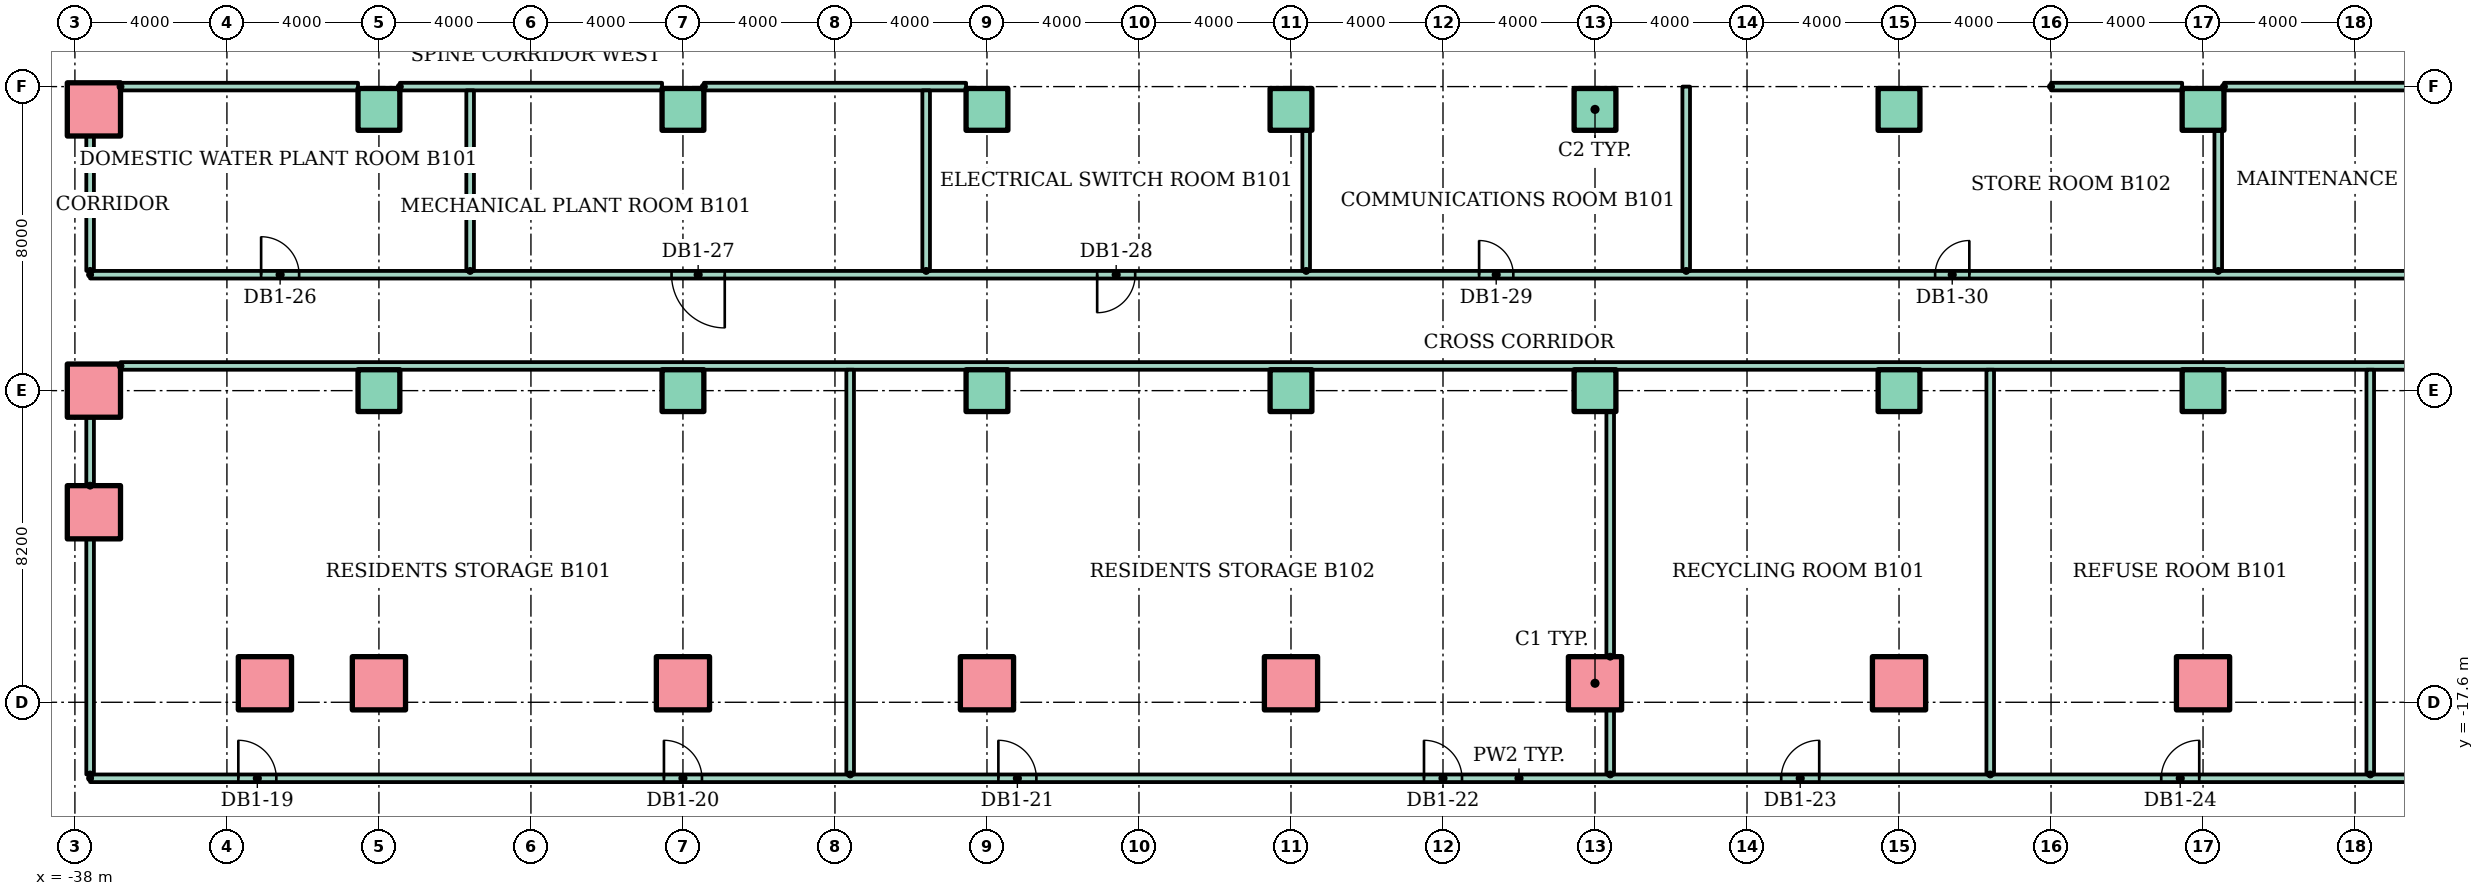
"""IFC4 building model, lengths in metres.
Left out: names, types, materials, properties, quantities, classifications, styles, units other than length and angle.
Written with IfcOpenShell. Run it as: python <this file> out.ifc"""

import sys

from ifc_helpers import new_model, si_unit, direction, frame, frame_2d, origin, origin_2d, place, context, subcontext, project, spatial, rectangle, hollow_rectangle, extrude, element, fill, save


model = new_model("IFC4")
c1 = context("Model", 3, precision=1e-05, world=origin(), true_north=direction((0.0, 1.0)))
c2 = subcontext(c1, "Body", "Model", "MODEL_VIEW")
j1 = project(units=[si_unit("LENGTHUNIT", "METRE"), si_unit("PLANEANGLEUNIT", "RADIAN")], contexts=[c1])
p1 = place(None, origin())
s1 = spatial("IfcSite", under=j1, at=p1, CompositionType="ELEMENT")
p2 = place(p1, origin())
s2 = spatial("IfcBuilding", under=s1, at=p2, CompositionType="ELEMENT")
p3 = place(p2, frame((0.0, 0.0, -5.0)))
s3 = spatial("IfcBuildingStorey", under=s2, at=p3, CompositionType="ELEMENT", Elevation=-5.0)
for number, where in (
    (1, (-33.0, -17.1, 0.0)),
    (2, (-30.0, -17.1, 0.0)),
    (3, (-22.0, -17.1, 0.0)),
    (4, (-14.0, -17.1, 0.0)),
    (5, (-6.0, -17.1, 0.0)),
    (6, (2.0, -17.1, 0.0)),
    (7, (10.0, -17.1, 0.0)),
    (8, (18.0, -17.1, 0.0)),
    (9, (-37.5, -12.6, 0.0)),
    (10, (-37.5, -9.4, 0.0)),
):
    element("IfcColumn", number, at=place(p3, frame(where)), inside=s3, PredefinedType="COLUMN", context=c2, shape_type="SweptSolid", body=[
        extrude(hollow_rectangle(XDim=1.4, YDim=1.4, WallThickness=0.08, at=origin_2d()), origin(), (0.0, 0.0, 1.0), 5.0),
    ])
for number, where in (
    (11, (-30.0, -9.4, 0.0)),
    (12, (-22.0, -9.4, 0.0)),
    (13, (-14.0, -9.4, 0.0)),
    (14, (-6.0, -9.4, 0.0)),
    (15, (2.0, -9.4, 0.0)),
    (16, (10.0, -9.4, 0.0)),
    (17, (18.0, -9.4, 0.0)),
):
    element("IfcColumn", number, at=place(p3, frame(where)), inside=s3, PredefinedType="COLUMN", context=c2, shape_type="SweptSolid", body=[
        extrude(rectangle(XDim=1.1, YDim=1.1, at=origin_2d()), origin(), (0.0, 0.0, 1.0), 5.0),
    ])
p4 = place(p3, frame((-37.5, -2.0, 0.0)))
e18 = element("IfcColumn", 18, at=p4, inside=s3, PredefinedType="COLUMN", context=c2, shape_type="SweptSolid", body=[
    extrude(hollow_rectangle(XDim=1.4, YDim=1.4, WallThickness=0.08, at=origin_2d()), origin(), (0.0, 0.0, 1.0), 5.0),
])
for number, where in (
    (19, (-30.0, -2.0, 0.0)),
    (20, (-22.0, -2.0, 0.0)),
    (21, (-14.0, -2.0, 0.0)),
    (22, (-6.0, -2.0, 0.0)),
    (23, (2.0, -2.0, 0.0)),
    (24, (10.0, -2.0, 0.0)),
    (25, (18.0, -2.0, 0.0)),
):
    element("IfcColumn", number, at=place(p3, frame(where)), inside=s3, PredefinedType="COLUMN", context=c2, shape_type="SweptSolid", body=[
        extrude(rectangle(XDim=1.1, YDim=1.1, at=origin_2d()), origin(), (0.0, 0.0, 1.0), 5.0),
    ])
p5 = place(p3, frame((-37.6, -19.6, 0.0)))
e26 = element("IfcWall", 26, at=p5, inside=s3, PredefinedType="PARTITIONING", context=c2, shape_type="SweptSolid", body=[
    extrude(rectangle(XDim=75.2, YDim=0.2, at=frame_2d((37.6, 0.0))), origin(), (0.0, 0.0, 1.0), 4.58),
])
p6 = place(p5, frame((3.9, 0.0, 0.0)))
e27 = element("IfcOpeningElement", 27, at=p6, cuts=e26, PredefinedType="OPENING", context=c2, shape_type="SweptSolid", body=[
    extrude(rectangle(XDim=1.0, YDim=2.1, at=frame_2d((0.5, 1.05))), frame((0.0, 0.11, 0.0), z_axis=(0.0, -1.0, 0.0), x_axis=(1.0, 0.0, 0.0)), (0.0, 0.0, 1.0), 0.22),
])
p7 = place(p5, frame((15.1, 0.0, 0.0)))
e28 = element("IfcOpeningElement", 28, at=p7, cuts=e26, PredefinedType="OPENING", context=c2, shape_type="SweptSolid", body=[
    extrude(rectangle(XDim=1.0, YDim=2.1, at=frame_2d((0.5, 1.05))), frame((0.0, 0.11, 0.0), z_axis=(0.0, -1.0, 0.0), x_axis=(1.0, 0.0, 0.0)), (0.0, 0.0, 1.0), 0.22),
])
p8 = place(p5, frame((23.9, 0.0, 0.0)))
e29 = element("IfcOpeningElement", 29, at=p8, cuts=e26, PredefinedType="OPENING", context=c2, shape_type="SweptSolid", body=[
    extrude(rectangle(XDim=1.0, YDim=2.1, at=frame_2d((0.5, 1.05))), frame((0.0, 0.11, 0.0), z_axis=(0.0, -1.0, 0.0), x_axis=(1.0, 0.0, 0.0)), (0.0, 0.0, 1.0), 0.22),
])
p9 = place(p5, frame((35.1, 0.0, 0.0)))
e30 = element("IfcOpeningElement", 30, at=p9, cuts=e26, PredefinedType="OPENING", context=c2, shape_type="SweptSolid", body=[
    extrude(rectangle(XDim=1.0, YDim=2.1, at=frame_2d((0.5, 1.05))), frame((0.0, 0.11, 0.0), z_axis=(0.0, -1.0, 0.0), x_axis=(1.0, 0.0, 0.0)), (0.0, 0.0, 1.0), 0.22),
])
p10 = place(p5, frame((44.5, 0.0, 0.0)))
e31 = element("IfcOpeningElement", 31, at=p10, cuts=e26, PredefinedType="OPENING", context=c2, shape_type="SweptSolid", body=[
    extrude(rectangle(XDim=1.0, YDim=2.1, at=frame_2d((0.5, 1.05))), frame((0.0, 0.11, 0.0), z_axis=(0.0, -1.0, 0.0), x_axis=(1.0, 0.0, 0.0)), (0.0, 0.0, 1.0), 0.22),
])
p11 = place(p5, frame((54.5, 0.0, 0.0)))
e32 = element("IfcOpeningElement", 32, at=p11, cuts=e26, PredefinedType="OPENING", context=c2, shape_type="SweptSolid", body=[
    extrude(rectangle(XDim=1.0, YDim=2.1, at=frame_2d((0.5, 1.05))), frame((0.0, 0.11, 0.0), z_axis=(0.0, -1.0, 0.0), x_axis=(1.0, 0.0, 0.0)), (0.0, 0.0, 1.0), 0.22),
])
p12 = place(p5, frame((67.15, 0.0, 0.0)))
e33 = element("IfcOpeningElement", 33, at=p12, cuts=e26, PredefinedType="OPENING", context=c2, shape_type="SweptSolid", body=[
    extrude(rectangle(XDim=0.9, YDim=2.1, at=frame_2d((0.45, 1.05))), frame((0.0, 0.11, 0.0), z_axis=(0.0, -1.0, 0.0), x_axis=(1.0, 0.0, 0.0)), (0.0, 0.0, 1.0), 0.22),
])
p13 = place(p3, frame((-36.8, -8.75, 0.0)))
e34 = element("IfcWall", 34, at=p13, inside=s3, PredefinedType="PARTITIONING", context=c2, shape_type="SweptSolid", body=[
    extrude(rectangle(XDim=73.6, YDim=0.2, at=frame_2d((36.8, 0.0))), origin(), (0.0, 0.0, 1.0), 4.58),
])
p14 = place(p3, frame((-37.6, -6.35, 0.0)))
e35 = element("IfcWall", 35, at=p14, inside=s3, PredefinedType="PARTITIONING", context=c2, shape_type="SweptSolid", body=[
    extrude(rectangle(XDim=75.2, YDim=0.2, at=frame_2d((37.6, 0.0))), origin(), (0.0, 0.0, 1.0), 4.58),
])
p15 = place(p14, frame((4.5, 0.0, 0.0)))
e36 = element("IfcOpeningElement", 36, at=p15, cuts=e35, PredefinedType="OPENING", context=c2, shape_type="SweptSolid", body=[
    extrude(rectangle(XDim=1.0, YDim=2.1, at=frame_2d((0.5, 1.05))), frame((0.0, 0.11, 0.0), z_axis=(0.0, -1.0, 0.0), x_axis=(1.0, 0.0, 0.0)), (0.0, 0.0, 1.0), 0.22),
])
p16 = place(p14, frame((15.3, 0.0, 0.0)))
e37 = element("IfcOpeningElement", 37, at=p16, cuts=e35, PredefinedType="OPENING", context=c2, shape_type="SweptSolid", body=[
    extrude(rectangle(XDim=1.4, YDim=2.1, at=frame_2d((0.7, 1.05))), frame((0.0, 0.11, 0.0), z_axis=(0.0, -1.0, 0.0), x_axis=(1.0, 0.0, 0.0)), (0.0, 0.0, 1.0), 0.22),
])
p17 = place(p14, frame((26.5, 0.0, 0.0)))
e38 = element("IfcOpeningElement", 38, at=p17, cuts=e35, PredefinedType="OPENING", context=c2, shape_type="SweptSolid", body=[
    extrude(rectangle(XDim=1.0, YDim=2.1, at=frame_2d((0.5, 1.05))), frame((0.0, 0.11, 0.0), z_axis=(0.0, -1.0, 0.0), x_axis=(1.0, 0.0, 0.0)), (0.0, 0.0, 1.0), 0.22),
])
p18 = place(p14, frame((36.55, 0.0, 0.0)))
e39 = element("IfcOpeningElement", 39, at=p18, cuts=e35, PredefinedType="OPENING", context=c2, shape_type="SweptSolid", body=[
    extrude(rectangle(XDim=0.9, YDim=2.1, at=frame_2d((0.45, 1.05))), frame((0.0, 0.11, 0.0), z_axis=(0.0, -1.0, 0.0), x_axis=(1.0, 0.0, 0.0)), (0.0, 0.0, 1.0), 0.22),
])
p19 = place(p14, frame((48.55, 0.0, 0.0)))
e40 = element("IfcOpeningElement", 40, at=p19, cuts=e35, PredefinedType="OPENING", context=c2, shape_type="SweptSolid", body=[
    extrude(rectangle(XDim=0.9, YDim=2.1, at=frame_2d((0.45, 1.05))), frame((0.0, 0.11, 0.0), z_axis=(0.0, -1.0, 0.0), x_axis=(1.0, 0.0, 0.0)), (0.0, 0.0, 1.0), 0.22),
])
p20 = place(p14, frame((65.1, 0.0, 0.0)))
e41 = element("IfcOpeningElement", 41, at=p20, cuts=e35, PredefinedType="OPENING", context=c2, shape_type="SweptSolid", body=[
    extrude(rectangle(XDim=1.0, YDim=2.1, at=frame_2d((0.5, 1.05))), frame((0.0, 0.11, 0.0), z_axis=(0.0, -1.0, 0.0), x_axis=(1.0, 0.0, 0.0)), (0.0, 0.0, 1.0), 0.22),
])
p21 = place(p3, frame((-36.8, -1.4, 0.0)))
e42 = element("IfcWall", 42, at=p21, inside=s3, PredefinedType="PARTITIONING", context=c2, shape_type="SweptSolid", body=[
    extrude(rectangle(XDim=6.25, YDim=0.2, at=frame_2d((3.125, 0.0))), origin(), (0.0, 0.0, 1.0), 4.58),
])
for number, where in (
    (43, (-29.45, -1.4, 0.0)),
    (44, (-21.45, -1.4, 0.0)),
):
    element("IfcWall", number, at=place(p3, frame(where)), inside=s3, PredefinedType="PARTITIONING", context=c2, shape_type="SweptSolid", body=[
        extrude(rectangle(XDim=6.9, YDim=0.2, at=frame_2d((3.45, 0.0))), origin(), (0.0, 0.0, 1.0), 4.58),
    ])
p22 = place(p3, frame((14.0, -1.4, 0.0)))
e45 = element("IfcWall", 45, at=p22, inside=s3, PredefinedType="PARTITIONING", context=c2, shape_type="SweptSolid", body=[
    extrude(rectangle(XDim=3.45, YDim=0.2, at=frame_2d((1.725, 0.0))), origin(), (0.0, 0.0, 1.0), 4.58),
])
p23 = place(p3, frame((18.55, -1.4, 0.0)))
e46 = element("IfcWall", 46, at=p23, inside=s3, PredefinedType="PARTITIONING", context=c2, shape_type="SweptSolid", body=[
    extrude(rectangle(XDim=6.9, YDim=0.2, at=frame_2d((3.45, 0.0))), origin(), (0.0, 0.0, 1.0), 4.58),
])
p24 = place(p3, frame((-37.6, -19.5, 0.0), z_axis=(0.0, 0.0, 1.0), x_axis=(0.0, 1.0, 0.0)))
e47 = element("IfcWall", 47, at=p24, inside=s3, PredefinedType="PARTITIONING", context=c2, shape_type="SweptSolid", body=[
    extrude(rectangle(XDim=6.2, YDim=0.2, at=frame_2d((3.1, 0.0))), origin(), (0.0, 0.0, 1.0), 4.58),
])
p25 = place(p3, frame((-37.6, -11.9, 0.0), z_axis=(0.0, 0.0, 1.0), x_axis=(0.0, 1.0, 0.0)))
e48 = element("IfcWall", 48, at=p25, inside=s3, PredefinedType="PARTITIONING", context=c2, shape_type="SweptSolid", body=[
    extrude(rectangle(XDim=1.8, YDim=0.2, at=frame_2d((0.9, 0.0))), origin(), (0.0, 0.0, 1.0), 4.58),
])
p26 = place(p3, frame((-37.6, -6.25, 0.0), z_axis=(0.0, 0.0, 1.0), x_axis=(0.0, 1.0, 0.0)))
e49 = element("IfcWall", 49, at=p26, inside=s3, PredefinedType="PARTITIONING", context=c2, shape_type="SweptSolid", body=[
    extrude(rectangle(XDim=3.55, YDim=0.2, at=frame_2d((1.775, 0.0))), origin(), (0.0, 0.0, 1.0), 4.58),
])
p27 = place(p3, frame((-27.6, -6.25, 0.0), z_axis=(0.0, 0.0, 1.0), x_axis=(0.0, 1.0, 0.0)))
e50 = element("IfcWall", 50, at=p27, inside=s3, PredefinedType="PARTITIONING", context=c2, shape_type="SweptSolid", body=[
    extrude(rectangle(XDim=4.75, YDim=0.2, at=frame_2d((2.375, 0.0))), origin(), (0.0, 0.0, 1.0), 4.58),
])
p28 = place(p3, frame((-17.6, -19.5, 0.0), z_axis=(0.0, 0.0, 1.0), x_axis=(0.0, 1.0, 0.0)))
e51 = element("IfcWall", 51, at=p28, inside=s3, PredefinedType="PARTITIONING", context=c2, shape_type="SweptSolid", body=[
    extrude(rectangle(XDim=10.65, YDim=0.2, at=frame_2d((5.325, 0.0))), origin(), (0.0, 0.0, 1.0), 4.58),
])
p29 = place(p3, frame((-15.6, -6.25, 0.0), z_axis=(0.0, 0.0, 1.0), x_axis=(0.0, 1.0, 0.0)))
e52 = element("IfcWall", 52, at=p29, inside=s3, PredefinedType="PARTITIONING", context=c2, shape_type="SweptSolid", body=[
    extrude(rectangle(XDim=4.75, YDim=0.2, at=frame_2d((2.375, 0.0))), origin(), (0.0, 0.0, 1.0), 4.58),
])
p30 = place(p3, frame((-5.6, -6.25, 0.0), z_axis=(0.0, 0.0, 1.0), x_axis=(0.0, 1.0, 0.0)))
e53 = element("IfcWall", 53, at=p30, inside=s3, PredefinedType="PARTITIONING", context=c2, shape_type="SweptSolid", body=[
    extrude(rectangle(XDim=3.7, YDim=0.2, at=frame_2d((1.85, 0.0))), origin(), (0.0, 0.0, 1.0), 4.58),
])
p31 = place(p3, frame((2.4, -19.5, 0.0), z_axis=(0.0, 0.0, 1.0), x_axis=(0.0, 1.0, 0.0)))
e54 = element("IfcWall", 54, at=p31, inside=s3, PredefinedType="PARTITIONING", context=c2, shape_type="SweptSolid", body=[
    extrude(rectangle(XDim=1.7, YDim=0.2, at=frame_2d((0.85, 0.0))), origin(), (0.0, 0.0, 1.0), 4.58),
])
p32 = place(p3, frame((2.4, -16.4, 0.0), z_axis=(0.0, 0.0, 1.0), x_axis=(0.0, 1.0, 0.0)))
e55 = element("IfcWall", 55, at=p32, inside=s3, PredefinedType="PARTITIONING", context=c2, shape_type="SweptSolid", body=[
    extrude(rectangle(XDim=6.45, YDim=0.2, at=frame_2d((3.225, 0.0))), origin(), (0.0, 0.0, 1.0), 4.58),
])
p33 = place(p3, frame((4.4, -6.25, 0.0), z_axis=(0.0, 0.0, 1.0), x_axis=(0.0, 1.0, 0.0)))
e56 = element("IfcWall", 56, at=p33, inside=s3, PredefinedType="PARTITIONING", context=c2, shape_type="SweptSolid", body=[
    extrude(rectangle(XDim=4.85, YDim=0.2, at=frame_2d((2.425, 0.0))), origin(), (0.0, 0.0, 1.0), 4.58),
])
p34 = place(p3, frame((12.4, -19.5, 0.0), z_axis=(0.0, 0.0, 1.0), x_axis=(0.0, 1.0, 0.0)))
e57 = element("IfcWall", 57, at=p34, inside=s3, PredefinedType="PARTITIONING", context=c2, shape_type="SweptSolid", body=[
    extrude(rectangle(XDim=10.65, YDim=0.2, at=frame_2d((5.325, 0.0))), origin(), (0.0, 0.0, 1.0), 4.58),
])
p35 = place(p3, frame((18.4, -6.25, 0.0), z_axis=(0.0, 0.0, 1.0), x_axis=(0.0, 1.0, 0.0)))
e58 = element("IfcWall", 58, at=p35, inside=s3, PredefinedType="PARTITIONING", context=c2, shape_type="SweptSolid", body=[
    extrude(rectangle(XDim=3.7, YDim=0.2, at=frame_2d((1.85, 0.0))), origin(), (0.0, 0.0, 1.0), 4.58),
])
p36 = place(p3, frame((22.4, -19.5, 0.0), z_axis=(0.0, 0.0, 1.0), x_axis=(0.0, 1.0, 0.0)))
e59 = element("IfcWall", 59, at=p36, inside=s3, PredefinedType="PARTITIONING", context=c2, shape_type="SweptSolid", body=[
    extrude(rectangle(XDim=10.65, YDim=0.2, at=frame_2d((5.325, 0.0))), origin(), (0.0, 0.0, 1.0), 4.58),
])
p37 = place(p6, origin())
e60 = element("IfcDoor", 60, at=p37, inside=s3, OperationType="SINGLE_SWING_LEFT", PredefinedType="DOOR", context=c2, shape_type="SweptSolid", body=[
    extrude(rectangle(XDim=1.0, YDim=2.1, at=frame_2d((0.5, 1.05))), frame((0.0, 0.025, 0.0), z_axis=(0.0, -1.0, 0.0), x_axis=(1.0, 0.0, 0.0)), (0.0, 0.0, 1.0), 0.05),
])
fill(e27, e60)
p38 = place(p7, origin())
e61 = element("IfcDoor", 61, at=p38, inside=s3, OperationType="SINGLE_SWING_LEFT", PredefinedType="DOOR", context=c2, shape_type="SweptSolid", body=[
    extrude(rectangle(XDim=1.0, YDim=2.1, at=frame_2d((0.5, 1.05))), frame((0.0, 0.025, 0.0), z_axis=(0.0, -1.0, 0.0), x_axis=(1.0, 0.0, 0.0)), (0.0, 0.0, 1.0), 0.05),
])
fill(e28, e61)
p39 = place(p8, origin())
e62 = element("IfcDoor", 62, at=p39, inside=s3, OperationType="SINGLE_SWING_LEFT", PredefinedType="DOOR", context=c2, shape_type="SweptSolid", body=[
    extrude(rectangle(XDim=1.0, YDim=2.1, at=frame_2d((0.5, 1.05))), frame((0.0, 0.025, 0.0), z_axis=(0.0, -1.0, 0.0), x_axis=(1.0, 0.0, 0.0)), (0.0, 0.0, 1.0), 0.05),
])
fill(e29, e62)
p40 = place(p9, origin())
e63 = element("IfcDoor", 63, at=p40, inside=s3, OperationType="SINGLE_SWING_LEFT", PredefinedType="DOOR", context=c2, shape_type="SweptSolid", body=[
    extrude(rectangle(XDim=1.0, YDim=2.1, at=frame_2d((0.5, 1.05))), frame((0.0, 0.025, 0.0), z_axis=(0.0, -1.0, 0.0), x_axis=(1.0, 0.0, 0.0)), (0.0, 0.0, 1.0), 0.05),
])
fill(e30, e63)
p41 = place(p10, origin())
e64 = element("IfcDoor", 64, at=p41, inside=s3, OperationType="SINGLE_SWING_RIGHT", PredefinedType="DOOR", context=c2, shape_type="SweptSolid", body=[
    extrude(rectangle(XDim=1.0, YDim=2.1, at=frame_2d((0.5, 1.05))), frame((0.0, 0.025, 0.0), z_axis=(0.0, -1.0, 0.0), x_axis=(1.0, 0.0, 0.0)), (0.0, 0.0, 1.0), 0.05),
])
fill(e31, e64)
p42 = place(p11, origin())
e65 = element("IfcDoor", 65, at=p42, inside=s3, OperationType="SINGLE_SWING_RIGHT", PredefinedType="DOOR", context=c2, shape_type="SweptSolid", body=[
    extrude(rectangle(XDim=1.0, YDim=2.1, at=frame_2d((0.5, 1.05))), frame((0.0, 0.025, 0.0), z_axis=(0.0, -1.0, 0.0), x_axis=(1.0, 0.0, 0.0)), (0.0, 0.0, 1.0), 0.05),
])
fill(e32, e65)
p43 = place(p15, origin())
e66 = element("IfcDoor", 66, at=p43, inside=s3, OperationType="SINGLE_SWING_LEFT", PredefinedType="DOOR", context=c2, shape_type="SweptSolid", body=[
    extrude(rectangle(XDim=1.0, YDim=2.1, at=frame_2d((0.5, 1.05))), frame((0.0, 0.025, 0.0), z_axis=(0.0, -1.0, 0.0), x_axis=(1.0, 0.0, 0.0)), (0.0, 0.0, 1.0), 0.05),
])
fill(e36, e66)
p44 = place(p16, frame((1.4, 0.0, 0.0), z_axis=(0.0, 0.0, 1.0), x_axis=(-1.0, 0.0, 0.0)))
e67 = element("IfcDoor", 67, at=p44, inside=s3, OperationType="DOUBLE_DOOR_SINGLE_SWING", PredefinedType="DOOR", context=c2, shape_type="SweptSolid", body=[
    extrude(rectangle(XDim=1.4, YDim=2.1, at=frame_2d((0.7, 1.05))), frame((0.0, 0.025, 0.0), z_axis=(0.0, -1.0, 0.0), x_axis=(1.0, 0.0, 0.0)), (0.0, 0.0, 1.0), 0.05),
])
fill(e37, e67)
p45 = place(p17, frame((1.0, 0.0, 0.0), z_axis=(0.0, 0.0, 1.0), x_axis=(-1.0, 0.0, 0.0)))
e68 = element("IfcDoor", 68, at=p45, inside=s3, OperationType="SINGLE_SWING_LEFT", PredefinedType="DOOR", context=c2, shape_type="SweptSolid", body=[
    extrude(rectangle(XDim=1.0, YDim=2.1, at=frame_2d((0.5, 1.05))), frame((0.0, 0.025, 0.0), z_axis=(0.0, -1.0, 0.0), x_axis=(1.0, 0.0, 0.0)), (0.0, 0.0, 1.0), 0.05),
])
fill(e38, e68)
p46 = place(p18, origin())
e69 = element("IfcDoor", 69, at=p46, inside=s3, OperationType="SINGLE_SWING_LEFT", PredefinedType="DOOR", context=c2, shape_type="SweptSolid", body=[
    extrude(rectangle(XDim=0.9, YDim=2.1, at=frame_2d((0.45, 1.05))), frame((0.0, 0.025, 0.0), z_axis=(0.0, -1.0, 0.0), x_axis=(1.0, 0.0, 0.0)), (0.0, 0.0, 1.0), 0.05),
])
fill(e39, e69)
p47 = place(p19, origin())
e70 = element("IfcDoor", 70, at=p47, inside=s3, OperationType="SINGLE_SWING_RIGHT", PredefinedType="DOOR", context=c2, shape_type="SweptSolid", body=[
    extrude(rectangle(XDim=0.9, YDim=2.1, at=frame_2d((0.45, 1.05))), frame((0.0, 0.025, 0.0), z_axis=(0.0, -1.0, 0.0), x_axis=(1.0, 0.0, 0.0)), (0.0, 0.0, 1.0), 0.05),
])
fill(e40, e70)
save(model, sys.argv[1])
